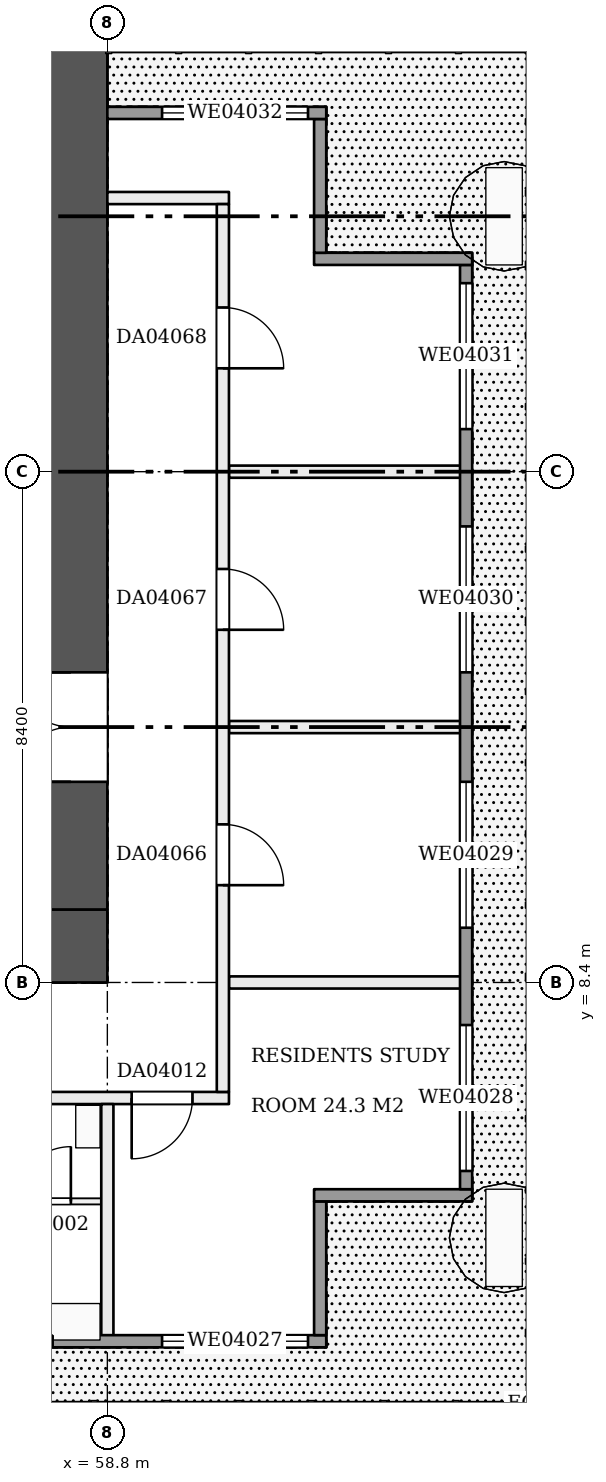
"""IFC4 building model, lengths in metres.
Left out: names, types, materials, properties, quantities, classifications, styles, units other than length and angle.
Written with IfcOpenShell. Run it as: python <this file> out.ifc"""

import sys

from ifc_helpers import new_model, si_unit, direction, frame, frame_2d, origin, place, context, subcontext, project, spatial, rectangle, extrude, element, fill, save


model = new_model("IFC4")
c1 = context("Model", 3, precision=1e-05, world=origin(), true_north=direction((0.0, 1.0)))
c2 = subcontext(c1, "Body", "Model", "MODEL_VIEW")
j1 = project(units=[si_unit("LENGTHUNIT", "METRE"), si_unit("PLANEANGLEUNIT", "RADIAN")], contexts=[c1])
p1 = place(None, origin())
s1 = spatial("IfcSite", under=j1, at=p1, CompositionType="ELEMENT")
p2 = place(p1, origin())
s2 = spatial("IfcBuilding", under=s1, at=p2, CompositionType="ELEMENT")
p3 = place(p2, frame((0.0, 0.0, 25.2)))
s3 = spatial("IfcBuildingStorey", under=s2, at=p3, CompositionType="ELEMENT", Elevation=25.2)
p4 = place(p3, frame((42.0, 9.0, 0.0), z_axis=(0.0, 0.0, 1.0), x_axis=(1.0, 0.0, 0.0)))
e1 = element("IfcWall", 1, at=p4, inside=s3, PredefinedType="SHEAR", context=c2, shape_type="SweptSolid", body=[
    extrude(rectangle(XDim=16.8, YDim=1.2, at=frame_2d((8.4, 0.0))), origin(), (0.0, 0.0, 1.0), 3.22),
])
p5 = place(p4, frame((3.1, 0.0, 0.0)))
e2 = element("IfcOpeningElement", 2, at=p5, cuts=e1, PredefinedType="OPENING", context=c2, shape_type="SweptSolid", body=[
    extrude(rectangle(XDim=1.0, YDim=2.1, at=frame_2d((0.5, 1.05))), frame((0.0, 0.61, 0.0), z_axis=(0.0, -1.0, 0.0), x_axis=(1.0, 0.0, 0.0)), (0.0, 0.0, 1.0), 1.22),
])
p6 = place(p4, frame((12.7, 0.0, 0.0)))
e3 = element("IfcOpeningElement", 3, at=p6, cuts=e1, PredefinedType="OPENING", context=c2, shape_type="SweptSolid", body=[
    extrude(rectangle(XDim=1.0, YDim=2.1, at=frame_2d((0.5, 1.05))), frame((0.0, 0.61, 0.0), z_axis=(0.0, -1.0, 0.0), x_axis=(1.0, 0.0, 0.0)), (0.0, 0.0, 1.0), 1.22),
])
p7 = place(p3, frame((58.2, 9.6, 0.0), z_axis=(0.0, 0.0, 1.0), x_axis=(0.0, 1.0, 0.0)))
e4 = element("IfcWall", 4, at=p7, inside=s3, PredefinedType="SHEAR", context=c2, shape_type="SweptSolid", body=[
    extrude(rectangle(XDim=14.4, YDim=1.2, at=frame_2d((7.2, 0.0))), origin(), (0.0, 0.0, 1.0), 3.22),
])
p8 = place(p7, frame((2.1, 0.0, 0.0)))
e5 = element("IfcOpeningElement", 5, at=p8, cuts=e4, PredefinedType="OPENING", context=c2, shape_type="SweptSolid", body=[
    extrude(rectangle(XDim=1.8, YDim=2.1, at=frame_2d((0.9, 1.05))), frame((0.0, 0.61, 0.0), z_axis=(0.0, -1.0, 0.0), x_axis=(1.0, 0.0, 0.0)), (0.0, 0.0, 1.0), 1.22),
])
p9 = place(p3, frame((54.65, 4.8, 0.0), z_axis=(0.0, 0.0, 1.0), x_axis=(1.0, 0.0, 0.0)))
e6 = element("IfcWall", 6, at=p9, inside=s3, PredefinedType="PARTITIONING", context=c2, shape_type="SweptSolid", body=[
    extrude(rectangle(XDim=4.05, YDim=0.1, at=frame_2d((2.025, 0.0))), origin(), (0.0, 0.0, 1.0), 3.22),
])
p10 = place(p9, frame((0.55, 0.0, 0.0)))
e7 = element("IfcOpeningElement", 7, at=p10, cuts=e6, PredefinedType="OPENING", context=c2, shape_type="SweptSolid", body=[
    extrude(rectangle(XDim=0.9, YDim=2.1, at=frame_2d((0.45, 1.05))), frame((0.0, 0.06, 0.0), z_axis=(0.0, -1.0, 0.0), x_axis=(1.0, 0.0, 0.0)), (0.0, 0.0, 1.0), 0.12),
])
p11 = place(p9, frame((2.65, 0.0, 0.0)))
e8 = element("IfcOpeningElement", 8, at=p11, cuts=e6, PredefinedType="OPENING", context=c2, shape_type="SweptSolid", body=[
    extrude(rectangle(XDim=0.9, YDim=2.1, at=frame_2d((0.45, 1.05))), frame((0.0, 0.06, 0.0), z_axis=(0.0, -1.0, 0.0), x_axis=(1.0, 0.0, 0.0)), (0.0, 0.0, 1.0), 0.12),
])
p12 = place(p3, frame((42.1, 6.5, 0.0), z_axis=(0.0, 0.0, 1.0), x_axis=(1.0, 0.0, 0.0)))
e9 = element("IfcWall", 9, at=p12, inside=s3, PredefinedType="PARTITIONING", context=c2, shape_type="SweptSolid", body=[
    extrude(rectangle(XDim=18.7, YDim=0.2, at=frame_2d((9.35, 0.0))), origin(), (0.0, 0.0, 1.0), 3.22),
])
p13 = place(p12, frame((1.5, 0.0, 0.0)))
e10 = element("IfcOpeningElement", 10, at=p13, cuts=e9, PredefinedType="OPENING", context=c2, shape_type="SweptSolid", body=[
    extrude(rectangle(XDim=1.0, YDim=2.1, at=frame_2d((0.5, 1.05))), frame((0.0, 0.11, 0.0), z_axis=(0.0, -1.0, 0.0), x_axis=(1.0, 0.0, 0.0)), (0.0, 0.0, 1.0), 0.22),
])
p14 = place(p12, frame((5.7, 0.0, 0.0)))
e11 = element("IfcOpeningElement", 11, at=p14, cuts=e9, PredefinedType="OPENING", context=c2, shape_type="SweptSolid", body=[
    extrude(rectangle(XDim=1.0, YDim=2.1, at=frame_2d((0.5, 1.05))), frame((0.0, 0.11, 0.0), z_axis=(0.0, -1.0, 0.0), x_axis=(1.0, 0.0, 0.0)), (0.0, 0.0, 1.0), 0.22),
])
p15 = place(p12, frame((13.1, 0.0, 0.0)))
e12 = element("IfcOpeningElement", 12, at=p15, cuts=e9, PredefinedType="OPENING", context=c2, shape_type="SweptSolid", body=[
    extrude(rectangle(XDim=1.0, YDim=2.1, at=frame_2d((0.5, 1.05))), frame((0.0, 0.11, 0.0), z_axis=(0.0, -1.0, 0.0), x_axis=(1.0, 0.0, 0.0)), (0.0, 0.0, 1.0), 0.22),
])
p16 = place(p12, frame((17.1, 0.0, 0.0)))
e13 = element("IfcOpeningElement", 13, at=p16, cuts=e9, PredefinedType="OPENING", context=c2, shape_type="SweptSolid", body=[
    extrude(rectangle(XDim=1.0, YDim=2.1, at=frame_2d((0.5, 1.05))), frame((0.0, 0.11, 0.0), z_axis=(0.0, -1.0, 0.0), x_axis=(1.0, 0.0, 0.0)), (0.0, 0.0, 1.0), 0.22),
])
for number, where, z_axis, x_axis in (
    (14, (60.8, 8.4, 0.0), (0.0, 0.0, 1.0), (1.0, 0.0, 0.0)),
    (15, (60.8, 12.6, 0.0), (0.0, 0.0, 1.0), (1.0, 0.0, 0.0)),
    (16, (60.8, 16.8, 0.0), (0.0, 0.0, 1.0), (1.0, 0.0, 0.0)),
):
    element("IfcWall", number, at=place(p3, frame(where, z_axis=z_axis, x_axis=x_axis)), inside=s3, PredefinedType="PARTITIONING", context=c2, shape_type="SweptSolid", body=[
        extrude(rectangle(XDim=3.9, YDim=0.2, at=frame_2d((1.95, 0.0))), origin(), (0.0, 0.0, 1.0), 3.22),
    ])
p17 = place(p3, frame((58.8, 21.3, 0.0), z_axis=(0.0, 0.0, 1.0), x_axis=(1.0, 0.0, 0.0)))
e17 = element("IfcWall", 17, at=p17, inside=s3, PredefinedType="PARTITIONING", context=c2, shape_type="SweptSolid", body=[
    extrude(rectangle(XDim=2.0, YDim=0.2, at=frame_2d((1.0, 0.0))), origin(), (0.0, 0.0, 1.0), 3.22),
])
p18 = place(p3, frame((58.8, 2.5, 0.0), z_axis=(0.0, 0.0, 1.0), x_axis=(0.0, 1.0, 0.0)))
e18 = element("IfcWall", 18, at=p18, inside=s3, PredefinedType="PARTITIONING", context=c2, shape_type="SweptSolid", body=[
    extrude(rectangle(XDim=3.9, YDim=0.2, at=frame_2d((1.95, 0.0))), origin(), (0.0, 0.0, 1.0), 3.22),
])
p19 = place(p3, frame((60.7, 6.6, 0.0), z_axis=(0.0, 0.0, 1.0), x_axis=(0.0, 1.0, 0.0)))
e19 = element("IfcWall", 19, at=p19, inside=s3, PredefinedType="PARTITIONING", context=c2, shape_type="SweptSolid", body=[
    extrude(rectangle(XDim=14.6, YDim=0.2, at=frame_2d((7.3, 0.0))), origin(), (0.0, 0.0, 1.0), 3.22),
])
p20 = place(p19, frame((3.4, 0.0, 0.0)))
e20 = element("IfcOpeningElement", 20, at=p20, cuts=e19, PredefinedType="OPENING", context=c2, shape_type="SweptSolid", body=[
    extrude(rectangle(XDim=1.0, YDim=2.1, at=frame_2d((0.5, 1.05))), frame((0.0, 0.11, 0.0), z_axis=(0.0, -1.0, 0.0), x_axis=(1.0, 0.0, 0.0)), (0.0, 0.0, 1.0), 0.22),
])
p21 = place(p19, frame((7.6, 0.0, 0.0)))
e21 = element("IfcOpeningElement", 21, at=p21, cuts=e19, PredefinedType="OPENING", context=c2, shape_type="SweptSolid", body=[
    extrude(rectangle(XDim=1.0, YDim=2.1, at=frame_2d((0.5, 1.05))), frame((0.0, 0.11, 0.0), z_axis=(0.0, -1.0, 0.0), x_axis=(1.0, 0.0, 0.0)), (0.0, 0.0, 1.0), 0.22),
])
p22 = place(p19, frame((11.9, 0.0, 0.0)))
e22 = element("IfcOpeningElement", 22, at=p22, cuts=e19, PredefinedType="OPENING", context=c2, shape_type="SweptSolid", body=[
    extrude(rectangle(XDim=1.0, YDim=2.1, at=frame_2d((0.5, 1.05))), frame((0.0, 0.11, 0.0), z_axis=(0.0, -1.0, 0.0), x_axis=(1.0, 0.0, 0.0)), (0.0, 0.0, 1.0), 0.22),
])
p23 = place(p3, frame((4.8, 2.5, 0.0), z_axis=(0.0, 0.0, 1.0), x_axis=(1.0, 0.0, 0.0)))
e23 = element("IfcWall", 23, at=p23, inside=s3, PredefinedType="SOLIDWALL", context=c2, shape_type="SweptSolid", body=[
    extrude(rectangle(XDim=57.6, YDim=0.2, at=frame_2d((28.8, 0.0))), origin(), (0.0, 0.0, 1.0), 3.22),
])
p24 = place(p23, frame((0.3, 0.0, 0.0)))
e24 = element("IfcOpeningElement", 24, at=p24, cuts=e23, PredefinedType="OPENING", context=c2, shape_type="SweptSolid", body=[
    extrude(rectangle(XDim=2.4, YDim=2.2, at=frame_2d((1.2, 1.1))), frame((0.0, 0.11, 0.0), z_axis=(0.0, -1.0, 0.0), x_axis=(1.0, 0.0, 0.0)), (0.0, 0.0, 1.0), 0.22),
])
p25 = place(p23, frame((4.5, 0.0, 0.0)))
e25 = element("IfcOpeningElement", 25, at=p25, cuts=e23, PredefinedType="OPENING", context=c2, shape_type="SweptSolid", body=[
    extrude(rectangle(XDim=2.4, YDim=2.2, at=frame_2d((1.2, 1.1))), frame((0.0, 0.11, 0.0), z_axis=(0.0, -1.0, 0.0), x_axis=(1.0, 0.0, 0.0)), (0.0, 0.0, 1.0), 0.22),
])
p26 = place(p23, frame((8.7, 0.0, 0.9)))
e26 = element("IfcOpeningElement", 26, at=p26, cuts=e23, PredefinedType="OPENING", context=c2, shape_type="SweptSolid", body=[
    extrude(rectangle(XDim=2.4, YDim=1.5, at=frame_2d((1.2, 0.75))), frame((0.0, 0.11, 0.0), z_axis=(0.0, -1.0, 0.0), x_axis=(1.0, 0.0, 0.0)), (0.0, 0.0, 1.0), 0.22),
])
p27 = place(p23, frame((12.9, 0.0, 0.9)))
e27 = element("IfcOpeningElement", 27, at=p27, cuts=e23, PredefinedType="OPENING", context=c2, shape_type="SweptSolid", body=[
    extrude(rectangle(XDim=2.4, YDim=1.5, at=frame_2d((1.2, 0.75))), frame((0.0, 0.11, 0.0), z_axis=(0.0, -1.0, 0.0), x_axis=(1.0, 0.0, 0.0)), (0.0, 0.0, 1.0), 0.22),
])
p28 = place(p23, frame((17.1, 0.0, 0.0)))
e28 = element("IfcOpeningElement", 28, at=p28, cuts=e23, PredefinedType="OPENING", context=c2, shape_type="SweptSolid", body=[
    extrude(rectangle(XDim=2.4, YDim=2.2, at=frame_2d((1.2, 1.1))), frame((0.0, 0.11, 0.0), z_axis=(0.0, -1.0, 0.0), x_axis=(1.0, 0.0, 0.0)), (0.0, 0.0, 1.0), 0.22),
])
p29 = place(p23, frame((21.3, 0.0, 0.9)))
e29 = element("IfcOpeningElement", 29, at=p29, cuts=e23, PredefinedType="OPENING", context=c2, shape_type="SweptSolid", body=[
    extrude(rectangle(XDim=2.4, YDim=1.5, at=frame_2d((1.2, 0.75))), frame((0.0, 0.11, 0.0), z_axis=(0.0, -1.0, 0.0), x_axis=(1.0, 0.0, 0.0)), (0.0, 0.0, 1.0), 0.22),
])
p30 = place(p23, frame((25.5, 0.0, 0.9)))
e30 = element("IfcOpeningElement", 30, at=p30, cuts=e23, PredefinedType="OPENING", context=c2, shape_type="SweptSolid", body=[
    extrude(rectangle(XDim=2.4, YDim=1.5, at=frame_2d((1.2, 0.75))), frame((0.0, 0.11, 0.0), z_axis=(0.0, -1.0, 0.0), x_axis=(1.0, 0.0, 0.0)), (0.0, 0.0, 1.0), 0.22),
])
p31 = place(p23, frame((29.7, 0.0, 0.9)))
e31 = element("IfcOpeningElement", 31, at=p31, cuts=e23, PredefinedType="OPENING", context=c2, shape_type="SweptSolid", body=[
    extrude(rectangle(XDim=2.4, YDim=1.5, at=frame_2d((1.2, 0.75))), frame((0.0, 0.11, 0.0), z_axis=(0.0, -1.0, 0.0), x_axis=(1.0, 0.0, 0.0)), (0.0, 0.0, 1.0), 0.22),
])
p32 = place(p23, frame((33.9, 0.0, 0.0)))
e32 = element("IfcOpeningElement", 32, at=p32, cuts=e23, PredefinedType="OPENING", context=c2, shape_type="SweptSolid", body=[
    extrude(rectangle(XDim=2.4, YDim=2.2, at=frame_2d((1.2, 1.1))), frame((0.0, 0.11, 0.0), z_axis=(0.0, -1.0, 0.0), x_axis=(1.0, 0.0, 0.0)), (0.0, 0.0, 1.0), 0.22),
])
p33 = place(p23, frame((38.1, 0.0, 0.9)))
e33 = element("IfcOpeningElement", 33, at=p33, cuts=e23, PredefinedType="OPENING", context=c2, shape_type="SweptSolid", body=[
    extrude(rectangle(XDim=2.4, YDim=1.5, at=frame_2d((1.2, 0.75))), frame((0.0, 0.11, 0.0), z_axis=(0.0, -1.0, 0.0), x_axis=(1.0, 0.0, 0.0)), (0.0, 0.0, 1.0), 0.22),
])
p34 = place(p23, frame((42.3, 0.0, 0.9)))
e34 = element("IfcOpeningElement", 34, at=p34, cuts=e23, PredefinedType="OPENING", context=c2, shape_type="SweptSolid", body=[
    extrude(rectangle(XDim=2.4, YDim=1.5, at=frame_2d((1.2, 0.75))), frame((0.0, 0.11, 0.0), z_axis=(0.0, -1.0, 0.0), x_axis=(1.0, 0.0, 0.0)), (0.0, 0.0, 1.0), 0.22),
])
p35 = place(p23, frame((46.5, 0.0, 0.0)))
e35 = element("IfcOpeningElement", 35, at=p35, cuts=e23, PredefinedType="OPENING", context=c2, shape_type="SweptSolid", body=[
    extrude(rectangle(XDim=2.4, YDim=2.2, at=frame_2d((1.2, 1.1))), frame((0.0, 0.11, 0.0), z_axis=(0.0, -1.0, 0.0), x_axis=(1.0, 0.0, 0.0)), (0.0, 0.0, 1.0), 0.22),
])
p36 = place(p23, frame((50.7, 0.0, 0.9)))
e36 = element("IfcOpeningElement", 36, at=p36, cuts=e23, PredefinedType="OPENING", context=c2, shape_type="SweptSolid", body=[
    extrude(rectangle(XDim=2.4, YDim=1.5, at=frame_2d((1.2, 0.75))), frame((0.0, 0.11, 0.0), z_axis=(0.0, -1.0, 0.0), x_axis=(1.0, 0.0, 0.0)), (0.0, 0.0, 1.0), 0.22),
])
p37 = place(p23, frame((54.9, 0.0, 0.9)))
e37 = element("IfcOpeningElement", 37, at=p37, cuts=e23, PredefinedType="OPENING", context=c2, shape_type="SweptSolid", body=[
    extrude(rectangle(XDim=2.4, YDim=1.5, at=frame_2d((1.2, 0.75))), frame((0.0, 0.11, 0.0), z_axis=(0.0, -1.0, 0.0), x_axis=(1.0, 0.0, 0.0)), (0.0, 0.0, 1.0), 0.22),
])
p38 = place(p3, frame((62.3, 2.6, 0.0), z_axis=(0.0, 0.0, 1.0), x_axis=(0.0, 1.0, 0.0)))
e38 = element("IfcWall", 38, at=p38, inside=s3, PredefinedType="SOLIDWALL", context=c2, shape_type="SweptSolid", body=[
    extrude(rectangle(XDim=2.2, YDim=0.2, at=frame_2d((1.1, 0.0))), origin(), (0.0, 0.0, 1.0), 3.22),
])
p39 = place(p3, frame((62.2, 4.9, 0.0), z_axis=(0.0, 0.0, 1.0), x_axis=(1.0, 0.0, 0.0)))
e39 = element("IfcWall", 39, at=p39, inside=s3, PredefinedType="SOLIDWALL", context=c2, shape_type="SweptSolid", body=[
    extrude(rectangle(XDim=2.6, YDim=0.2, at=frame_2d((1.3, 0.0))), origin(), (0.0, 0.0, 1.0), 3.22),
])
p40 = place(p3, frame((64.7, 5.0, 0.0), z_axis=(0.0, 0.0, 1.0), x_axis=(0.0, 1.0, 0.0)))
e40 = element("IfcWall", 40, at=p40, inside=s3, PredefinedType="SOLIDWALL", context=c2, shape_type="SweptSolid", body=[
    extrude(rectangle(XDim=15.2, YDim=0.2, at=frame_2d((7.6, 0.0))), origin(), (0.0, 0.0, 1.0), 3.22),
])
p41 = place(p40, frame((0.3, 0.0, 0.9)))
e41 = element("IfcOpeningElement", 41, at=p41, cuts=e40, PredefinedType="OPENING", context=c2, shape_type="SweptSolid", body=[
    extrude(rectangle(XDim=2.4, YDim=1.5, at=frame_2d((1.2, 0.75))), frame((0.0, 0.11, 0.0), z_axis=(0.0, -1.0, 0.0), x_axis=(1.0, 0.0, 0.0)), (0.0, 0.0, 1.0), 0.22),
])
p42 = place(p40, frame((4.3, 0.0, 0.9)))
e42 = element("IfcOpeningElement", 42, at=p42, cuts=e40, PredefinedType="OPENING", context=c2, shape_type="SweptSolid", body=[
    extrude(rectangle(XDim=2.4, YDim=1.5, at=frame_2d((1.2, 0.75))), frame((0.0, 0.11, 0.0), z_axis=(0.0, -1.0, 0.0), x_axis=(1.0, 0.0, 0.0)), (0.0, 0.0, 1.0), 0.22),
])
p43 = place(p40, frame((8.5, 0.0, 0.9)))
e43 = element("IfcOpeningElement", 43, at=p43, cuts=e40, PredefinedType="OPENING", context=c2, shape_type="SweptSolid", body=[
    extrude(rectangle(XDim=2.4, YDim=1.5, at=frame_2d((1.2, 0.75))), frame((0.0, 0.11, 0.0), z_axis=(0.0, -1.0, 0.0), x_axis=(1.0, 0.0, 0.0)), (0.0, 0.0, 1.0), 0.22),
])
p44 = place(p40, frame((12.5, 0.0, 0.9)))
e44 = element("IfcOpeningElement", 44, at=p44, cuts=e40, PredefinedType="OPENING", context=c2, shape_type="SweptSolid", body=[
    extrude(rectangle(XDim=2.4, YDim=1.5, at=frame_2d((1.2, 0.75))), frame((0.0, 0.11, 0.0), z_axis=(0.0, -1.0, 0.0), x_axis=(1.0, 0.0, 0.0)), (0.0, 0.0, 1.0), 0.22),
])
p45 = place(p3, frame((64.8, 20.3, 0.0), z_axis=(0.0, 0.0, 1.0), x_axis=(-1.0, 0.0, 0.0)))
e45 = element("IfcWall", 45, at=p45, inside=s3, PredefinedType="SOLIDWALL", context=c2, shape_type="SweptSolid", body=[
    extrude(rectangle(XDim=2.6, YDim=0.2, at=frame_2d((1.3, 0.0))), origin(), (0.0, 0.0, 1.0), 3.22),
])
p46 = place(p3, frame((62.3, 20.4, 0.0), z_axis=(0.0, 0.0, 1.0), x_axis=(0.0, 1.0, 0.0)))
e46 = element("IfcWall", 46, at=p46, inside=s3, PredefinedType="SOLIDWALL", context=c2, shape_type="SweptSolid", body=[
    extrude(rectangle(XDim=2.2, YDim=0.2, at=frame_2d((1.1, 0.0))), origin(), (0.0, 0.0, 1.0), 3.22),
])
p47 = place(p3, frame((62.4, 22.7, 0.0), z_axis=(0.0, 0.0, 1.0), x_axis=(-1.0, 0.0, 0.0)))
e47 = element("IfcWall", 47, at=p47, inside=s3, PredefinedType="SOLIDWALL", context=c2, shape_type="SweptSolid", body=[
    extrude(rectangle(XDim=3.6, YDim=0.2, at=frame_2d((1.8, 0.0))), origin(), (0.0, 0.0, 1.0), 3.22),
])
p48 = place(p47, frame((0.3, 0.0, 0.9)))
e48 = element("IfcOpeningElement", 48, at=p48, cuts=e47, PredefinedType="OPENING", context=c2, shape_type="SweptSolid", body=[
    extrude(rectangle(XDim=2.4, YDim=1.5, at=frame_2d((1.2, 0.75))), frame((0.0, 0.11, 0.0), z_axis=(0.0, -1.0, 0.0), x_axis=(1.0, 0.0, 0.0)), (0.0, 0.0, 1.0), 0.22),
])
p49 = place(p8, origin())
e49 = element("IfcDoor", 49, at=p49, inside=s3, OperationType="DOUBLE_DOOR_SINGLE_SWING", PredefinedType="DOOR", context=c2, shape_type="SweptSolid", body=[
    extrude(rectangle(XDim=1.8, YDim=2.1, at=frame_2d((0.9, 1.05))), frame((0.0, 0.025, 0.0), z_axis=(0.0, -1.0, 0.0), x_axis=(1.0, 0.0, 0.0)), (0.0, 0.0, 1.0), 0.05),
])
fill(e5, e49)
p50 = place(p11, origin())
e50 = element("IfcDoor", 50, at=p50, inside=s3, OperationType="SINGLE_SWING_RIGHT", PredefinedType="DOOR", context=c2, shape_type="SweptSolid", body=[
    extrude(rectangle(XDim=0.9, YDim=2.1, at=frame_2d((0.45, 1.05))), frame((0.0, 0.025, 0.0), z_axis=(0.0, -1.0, 0.0), x_axis=(1.0, 0.0, 0.0)), (0.0, 0.0, 1.0), 0.05),
])
fill(e8, e50)
p51 = place(p16, frame((1.0, 0.0, 0.0), z_axis=(0.0, 0.0, 1.0), x_axis=(-1.0, 0.0, 0.0)))
e51 = element("IfcDoor", 51, at=p51, inside=s3, OperationType="SINGLE_SWING_RIGHT", PredefinedType="DOOR", context=c2, shape_type="SweptSolid", body=[
    extrude(rectangle(XDim=1.0, YDim=2.1, at=frame_2d((0.5, 1.05))), frame((0.0, 0.025, 0.0), z_axis=(0.0, -1.0, 0.0), x_axis=(1.0, 0.0, 0.0)), (0.0, 0.0, 1.0), 0.05),
])
fill(e13, e51)
p52 = place(p20, frame((1.0, 0.0, 0.0), z_axis=(0.0, 0.0, 1.0), x_axis=(-1.0, 0.0, 0.0)))
e52 = element("IfcDoor", 52, at=p52, inside=s3, OperationType="SINGLE_SWING_RIGHT", PredefinedType="DOOR", context=c2, shape_type="SweptSolid", body=[
    extrude(rectangle(XDim=1.0, YDim=2.1, at=frame_2d((0.5, 1.05))), frame((0.0, 0.025, 0.0), z_axis=(0.0, -1.0, 0.0), x_axis=(1.0, 0.0, 0.0)), (0.0, 0.0, 1.0), 0.05),
])
fill(e20, e52)
p53 = place(p21, frame((1.0, 0.0, 0.0), z_axis=(0.0, 0.0, 1.0), x_axis=(-1.0, 0.0, 0.0)))
e53 = element("IfcDoor", 53, at=p53, inside=s3, OperationType="SINGLE_SWING_RIGHT", PredefinedType="DOOR", context=c2, shape_type="SweptSolid", body=[
    extrude(rectangle(XDim=1.0, YDim=2.1, at=frame_2d((0.5, 1.05))), frame((0.0, 0.025, 0.0), z_axis=(0.0, -1.0, 0.0), x_axis=(1.0, 0.0, 0.0)), (0.0, 0.0, 1.0), 0.05),
])
fill(e21, e53)
p54 = place(p22, frame((1.0, 0.0, 0.0), z_axis=(0.0, 0.0, 1.0), x_axis=(-1.0, 0.0, 0.0)))
e54 = element("IfcDoor", 54, at=p54, inside=s3, OperationType="SINGLE_SWING_RIGHT", PredefinedType="DOOR", context=c2, shape_type="SweptSolid", body=[
    extrude(rectangle(XDim=1.0, YDim=2.1, at=frame_2d((0.5, 1.05))), frame((0.0, 0.025, 0.0), z_axis=(0.0, -1.0, 0.0), x_axis=(1.0, 0.0, 0.0)), (0.0, 0.0, 1.0), 0.05),
])
fill(e22, e54)
p55 = place(p37, origin())
e55 = element("IfcWindow", 55, at=p55, inside=s3, PartitioningType="SINGLE_PANEL", PredefinedType="WINDOW", context=c2, shape_type="SweptSolid", body=[
    extrude(rectangle(XDim=2.4, YDim=1.5, at=frame_2d((1.2, 0.75))), frame((0.0, 0.03, 0.0), z_axis=(0.0, -1.0, 0.0), x_axis=(1.0, 0.0, 0.0)), (0.0, 0.0, 1.0), 0.06),
])
fill(e37, e55)
p56 = place(p41, origin())
e56 = element("IfcWindow", 56, at=p56, inside=s3, PartitioningType="SINGLE_PANEL", PredefinedType="WINDOW", context=c2, shape_type="SweptSolid", body=[
    extrude(rectangle(XDim=2.4, YDim=1.5, at=frame_2d((1.2, 0.75))), frame((0.0, 0.03, 0.0), z_axis=(0.0, -1.0, 0.0), x_axis=(1.0, 0.0, 0.0)), (0.0, 0.0, 1.0), 0.06),
])
fill(e41, e56)
p57 = place(p42, origin())
e57 = element("IfcWindow", 57, at=p57, inside=s3, PartitioningType="SINGLE_PANEL", PredefinedType="WINDOW", context=c2, shape_type="SweptSolid", body=[
    extrude(rectangle(XDim=2.4, YDim=1.5, at=frame_2d((1.2, 0.75))), frame((0.0, 0.03, 0.0), z_axis=(0.0, -1.0, 0.0), x_axis=(1.0, 0.0, 0.0)), (0.0, 0.0, 1.0), 0.06),
])
fill(e42, e57)
p58 = place(p43, origin())
e58 = element("IfcWindow", 58, at=p58, inside=s3, PartitioningType="SINGLE_PANEL", PredefinedType="WINDOW", context=c2, shape_type="SweptSolid", body=[
    extrude(rectangle(XDim=2.4, YDim=1.5, at=frame_2d((1.2, 0.75))), frame((0.0, 0.03, 0.0), z_axis=(0.0, -1.0, 0.0), x_axis=(1.0, 0.0, 0.0)), (0.0, 0.0, 1.0), 0.06),
])
fill(e43, e58)
p59 = place(p44, origin())
e59 = element("IfcWindow", 59, at=p59, inside=s3, PartitioningType="SINGLE_PANEL", PredefinedType="WINDOW", context=c2, shape_type="SweptSolid", body=[
    extrude(rectangle(XDim=2.4, YDim=1.5, at=frame_2d((1.2, 0.75))), frame((0.0, 0.03, 0.0), z_axis=(0.0, -1.0, 0.0), x_axis=(1.0, 0.0, 0.0)), (0.0, 0.0, 1.0), 0.06),
])
fill(e44, e59)
p60 = place(p48, origin())
e60 = element("IfcWindow", 60, at=p60, inside=s3, PartitioningType="SINGLE_PANEL", PredefinedType="WINDOW", context=c2, shape_type="SweptSolid", body=[
    extrude(rectangle(XDim=2.4, YDim=1.5, at=frame_2d((1.2, 0.75))), frame((0.0, 0.03, 0.0), z_axis=(0.0, -1.0, 0.0), x_axis=(1.0, 0.0, 0.0)), (0.0, 0.0, 1.0), 0.06),
])
fill(e48, e60)
save(model, sys.argv[1])
